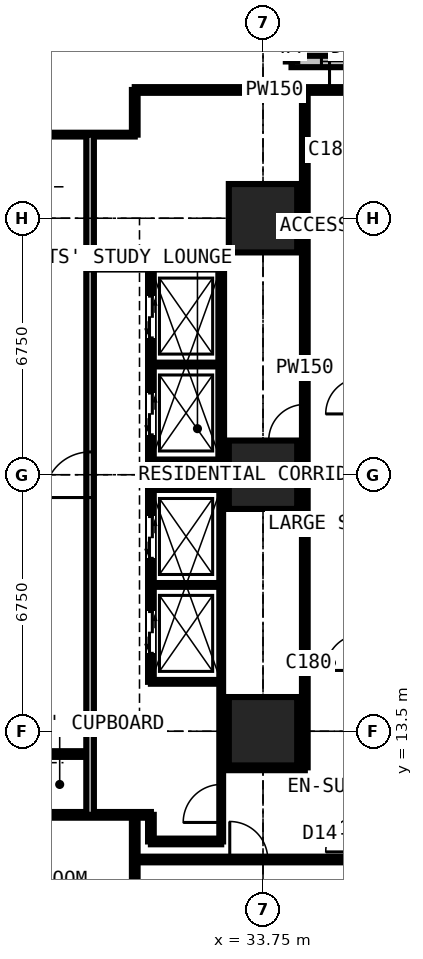
"""IFC4 building model, lengths in metres.
Left out: names, types, materials, properties, quantities, classifications, styles, units other than length and angle.
Written with IfcOpenShell. Run it as: python <this file> out.ifc"""

import sys

from ifc_helpers import new_model, si_unit, direction, frame, frame_2d, origin, origin_2d, place, context, subcontext, project, spatial, rectangle, extrude, element, fill, save


model = new_model("IFC4")
c1 = context("Model", 3, precision=1e-05, world=origin(), true_north=direction((0.0, 1.0)))
c2 = subcontext(c1, "Body", "Model", "MODEL_VIEW")
j1 = project(units=[si_unit("LENGTHUNIT", "METRE"), si_unit("PLANEANGLEUNIT", "RADIAN")], contexts=[c1])
p1 = place(None, origin())
s1 = spatial("IfcSite", under=j1, at=p1, CompositionType="ELEMENT")
p2 = place(p1, origin())
s2 = spatial("IfcBuilding", under=s1, at=p2, CompositionType="ELEMENT")
p3 = place(p2, frame((0.0, 0.0, 90.9)))
s3 = spatial("IfcBuildingStorey", under=s2, at=p3, CompositionType="ELEMENT", Elevation=90.9)
for number, where, z_axis, x_axis in (
    (1, (33.75, 13.5, 0.0), (0.0, 0.0, 1.0), (1.0, 0.0, 0.0)),
    (2, (33.75, 20.25, 0.0), (0.0, 0.0, 1.0), (1.0, 0.0, 0.0)),
    (3, (33.75, 27.0, 0.0), (0.0, 0.0, 1.0), (1.0, 0.0, 0.0)),
):
    element("IfcColumn", number, at=place(p3, frame(where, z_axis=z_axis, x_axis=x_axis)), inside=s3, PredefinedType="COLUMN", context=c2, shape_type="SweptSolid", body=[
        extrude(rectangle(XDim=1.8, YDim=1.8, at=origin_2d()), origin(), (0.0, 0.0, 1.0), 3.6),
    ])
p4 = place(p3, frame((37.875, 31.125, 0.0), z_axis=(0.0, 0.0, 1.0), x_axis=(-1.0, 0.0, 0.0)))
e4 = element("IfcWall", 4, at=p4, inside=s3, PredefinedType="SOLIDWALL", context=c2, shape_type="SweptSolid", body=[
    extrude(rectangle(XDim=3.375, YDim=0.3, at=frame_2d((1.688, 0.0))), origin(), (0.0, 0.0, 1.0), 3.375),
])
p5 = place(p4, frame((0.788, 0.0, 0.6)))
e5 = element("IfcOpeningElement", 5, at=p5, cuts=e4, PredefinedType="OPENING", context=c2, shape_type="SweptSolid", body=[
    extrude(rectangle(XDim=1.8, YDim=2.1, at=frame_2d((0.9, 1.05))), frame((0.0, 0.16, 0.0), z_axis=(0.0, -1.0, 0.0), x_axis=(1.0, 0.0, 0.0)), (0.0, 0.0, 1.0), 0.32),
])
p6 = place(p3, frame((34.5, 31.125, 0.0), z_axis=(0.0, 0.0, 1.0), x_axis=(0.0, 1.0, 0.0)))
e6 = element("IfcWall", 6, at=p6, inside=s3, PredefinedType="SOLIDWALL", context=c2, shape_type="SweptSolid", body=[
    extrude(rectangle(XDim=3.375, YDim=0.3, at=frame_2d((1.688, 0.0))), origin(), (0.0, 0.0, 1.0), 3.375),
])
p7 = place(p6, frame((0.343, 0.0, 0.9)))
e7 = element("IfcOpeningElement", 7, at=p7, cuts=e6, PredefinedType="OPENING", context=c2, shape_type="SweptSolid", body=[
    extrude(rectangle(XDim=1.2, YDim=1.8, at=frame_2d((0.6, 0.9))), frame((0.0, 0.16, 0.0), z_axis=(0.0, -1.0, 0.0), x_axis=(1.0, 0.0, 0.0)), (0.0, 0.0, 1.0), 0.32),
])
p8 = place(p3, frame((10.125, 11.3, 0.0), z_axis=(0.0, 0.0, 1.0), x_axis=(1.0, 0.0, 0.0)))
e8 = element("IfcWall", 8, at=p8, inside=s3, PredefinedType="PARTITIONING", context=c2, shape_type="SweptSolid", body=[
    extrude(rectangle(XDim=20.675, YDim=0.15, at=frame_2d((10.337, 0.0))), origin(), (0.0, 0.0, 1.0), 3.375),
])
p9 = place(p8, frame((8.375, 0.0, 0.0)))
e9 = element("IfcOpeningElement", 9, at=p9, cuts=e8, PredefinedType="OPENING", context=c2, shape_type="SweptSolid", body=[
    extrude(rectangle(XDim=1.0, YDim=2.2, at=frame_2d((0.5, 1.1))), frame((0.0, 0.085, 0.0), z_axis=(0.0, -1.0, 0.0), x_axis=(1.0, 0.0, 0.0)), (0.0, 0.0, 1.0), 0.17),
])
p10 = place(p8, frame((10.975, 0.0, 0.0)))
e10 = element("IfcOpeningElement", 10, at=p10, cuts=e8, PredefinedType="OPENING", context=c2, shape_type="SweptSolid", body=[
    extrude(rectangle(XDim=1.0, YDim=2.2, at=frame_2d((0.5, 1.1))), frame((0.0, 0.085, 0.0), z_axis=(0.0, -1.0, 0.0), x_axis=(1.0, 0.0, 0.0)), (0.0, 0.0, 1.0), 0.17),
])
p11 = place(p8, frame((3.925, 0.0, 0.0)))
e11 = element("IfcOpeningElement", 11, at=p11, cuts=e8, PredefinedType="OPENING", context=c2, shape_type="SweptSolid", body=[
    extrude(rectangle(XDim=0.95, YDim=2.2, at=frame_2d((0.475, 1.1))), frame((0.0, 0.085, 0.0), z_axis=(0.0, -1.0, 0.0), x_axis=(1.0, 0.0, 0.0)), (0.0, 0.0, 1.0), 0.17),
])
p12 = place(p3, frame((11.3, 29.2, 0.0), z_axis=(0.0, 0.0, 1.0), x_axis=(1.0, 0.0, 0.0)))
e12 = element("IfcWall", 12, at=p12, inside=s3, PredefinedType="PARTITIONING", context=c2, shape_type="SweptSolid", body=[
    extrude(rectangle(XDim=19.075, YDim=0.1, at=frame_2d((9.538, 0.0))), origin(), (0.0, 0.0, 1.0), 3.375),
])
p13 = place(p12, frame((6.4, 0.0, 0.0)))
e13 = element("IfcOpeningElement", 13, at=p13, cuts=e12, PredefinedType="OPENING", context=c2, shape_type="SweptSolid", body=[
    extrude(rectangle(XDim=0.95, YDim=2.2, at=frame_2d((0.475, 1.1))), frame((0.0, 0.06, 0.0), z_axis=(0.0, -1.0, 0.0), x_axis=(1.0, 0.0, 0.0)), (0.0, 0.0, 1.0), 0.12),
])
p14 = place(p12, frame((13.15, 0.0, 0.0)))
e14 = element("IfcOpeningElement", 14, at=p14, cuts=e12, PredefinedType="OPENING", context=c2, shape_type="SweptSolid", body=[
    extrude(rectangle(XDim=0.95, YDim=2.2, at=frame_2d((0.475, 1.1))), frame((0.0, 0.06, 0.0), z_axis=(0.0, -1.0, 0.0), x_axis=(1.0, 0.0, 0.0)), (0.0, 0.0, 1.0), 0.12),
])
p15 = place(p12, frame((0.6, 0.0, 0.0)))
e15 = element("IfcOpeningElement", 15, at=p15, cuts=e12, PredefinedType="OPENING", context=c2, shape_type="SweptSolid", body=[
    extrude(rectangle(XDim=1.0, YDim=2.2, at=frame_2d((0.5, 1.1))), frame((0.0, 0.06, 0.0), z_axis=(0.0, -1.0, 0.0), x_axis=(1.0, 0.0, 0.0)), (0.0, 0.0, 1.0), 0.12),
])
p16 = place(p3, frame((27.6, 12.9, 0.0), z_axis=(0.0, 0.0, 1.0), x_axis=(1.0, 0.0, 0.0)))
e16 = element("IfcWall", 16, at=p16, inside=s3, PredefinedType="PARTITIONING", context=c2, shape_type="SweptSolid", body=[
    extrude(rectangle(XDim=1.6, YDim=0.15, at=frame_2d((0.8, 0.0))), origin(), (0.0, 0.0, 1.0), 2.806),
])
p17 = place(p3, frame((29.2, 11.3, 0.0), z_axis=(0.0, 0.0, 1.0), x_axis=(0.0, 1.0, 0.0)))
e17 = element("IfcWall", 17, at=p17, inside=s3, PredefinedType="PARTITIONING", context=c2, shape_type="SweptSolid", body=[
    extrude(rectangle(XDim=17.9, YDim=0.2, at=frame_2d((8.95, 0.0))), origin(), (0.0, 0.0, 1.0), 3.375),
])
p18 = place(p17, frame((8.35, 0.0, 0.0)))
e18 = element("IfcOpeningElement", 18, at=p18, cuts=e17, PredefinedType="OPENING", context=c2, shape_type="SweptSolid", body=[
    extrude(rectangle(XDim=1.2, YDim=2.2, at=frame_2d((0.6, 1.1))), frame((0.0, 0.11, 0.0), z_axis=(0.0, -1.0, 0.0), x_axis=(1.0, 0.0, 0.0)), (0.0, 0.0, 1.0), 0.22),
])
p19 = place(p3, frame((29.2, 25.7, 0.0), z_axis=(0.0, 0.0, 1.0), x_axis=(1.0, 0.0, 0.0)))
e19 = element("IfcWall", 19, at=p19, inside=s3, PredefinedType="SHEAR", context=c2, shape_type="SweptSolid", body=[
    extrude(rectangle(XDim=3.45, YDim=0.1, at=frame_2d((1.725, 0.0))), origin(), (0.0, 0.0, 1.0), 3.375),
])
p20 = place(p3, frame((30.375, -0.734, 0.0), z_axis=(0.0, 0.0, 1.0), x_axis=(0.0, 1.0, 0.0)))
e20 = element("IfcWall", 20, at=p20, inside=s3, PredefinedType="PARTITIONING", context=c2, shape_type="SweptSolid", body=[
    extrude(rectangle(XDim=12.034, YDim=0.15, at=frame_2d((6.017, 0.0))), origin(), (0.0, 0.0, 1.0), 3.375),
])
p21 = place(p3, frame((30.375, 10.125, 0.0), z_axis=(0.0, 0.0, 1.0), x_axis=(1.0, 0.0, 0.0)))
e21 = element("IfcWall", 21, at=p21, inside=s3, PredefinedType="PARTITIONING", context=c2, shape_type="SweptSolid", body=[
    extrude(rectangle(XDim=10.859, YDim=0.15, at=frame_2d((5.429, 0.0))), origin(), (0.0, 0.0, 1.0), 3.375),
])
p22 = place(p21, frame((2.5, 0.0, 0.0)))
e22 = element("IfcOpeningElement", 22, at=p22, cuts=e21, PredefinedType="OPENING", context=c2, shape_type="SweptSolid", body=[
    extrude(rectangle(XDim=1.0, YDim=2.2, at=frame_2d((0.5, 1.1))), frame((0.0, 0.085, 0.0), z_axis=(0.0, -1.0, 0.0), x_axis=(1.0, 0.0, 0.0)), (0.0, 0.0, 1.0), 0.17),
])
p23 = place(p3, frame((30.375, 29.2, 0.0), z_axis=(0.0, 0.0, 1.0), x_axis=(0.0, 1.0, 0.0)))
e23 = element("IfcWall", 23, at=p23, inside=s3, PredefinedType="PARTITIONING", context=c2, shape_type="SweptSolid", body=[
    extrude(rectangle(XDim=1.175, YDim=0.15, at=frame_2d((0.587, 0.0))), origin(), (0.0, 0.0, 1.0), 3.375),
])
p24 = place(p3, frame((30.375, 30.375, 0.0), z_axis=(0.0, 0.0, 1.0), x_axis=(1.0, 0.0, 0.0)))
e24 = element("IfcWall", 24, at=p24, inside=s3, PredefinedType="PARTITIONING", context=c2, shape_type="SweptSolid", body=[
    extrude(rectangle(XDim=7.35, YDim=0.15, at=frame_2d((3.675, 0.0))), origin(), (0.0, 0.0, 1.0), 2.877),
])
p25 = place(p24, frame((5.125, 0.0, 0.0)))
e25 = element("IfcOpeningElement", 25, at=p25, cuts=e24, PredefinedType="OPENING", context=c2, shape_type="SweptSolid", body=[
    extrude(rectangle(XDim=1.0, YDim=2.2, at=frame_2d((0.5, 1.1))), frame((0.0, 0.085, 0.0), z_axis=(0.0, -1.0, 0.0), x_axis=(1.0, 0.0, 0.0)), (0.0, 0.0, 1.0), 0.17),
])
p26 = place(p3, frame((30.8, 10.6, 0.0), z_axis=(0.0, 0.0, 1.0), x_axis=(0.0, 1.0, 0.0)))
e26 = element("IfcWall", 26, at=p26, inside=s3, PredefinedType="PARTITIONING", context=c2, shape_type="SweptSolid", body=[
    extrude(rectangle(XDim=0.7, YDim=0.15, at=frame_2d((0.35, 0.0))), origin(), (0.0, 0.0, 1.0), 3.375),
])
p27 = place(p3, frame((30.8, 10.6, 0.0), z_axis=(0.0, 0.0, 1.0), x_axis=(1.0, 0.0, 0.0)))
e27 = element("IfcWall", 27, at=p27, inside=s3, PredefinedType="PARTITIONING", context=c2, shape_type="SweptSolid", body=[
    extrude(rectangle(XDim=1.85, YDim=0.15, at=frame_2d((0.925, 0.0))), origin(), (0.0, 0.0, 1.0), 3.375),
])
p28 = place(p3, frame((30.8, 14.8, 0.0), z_axis=(0.0, 0.0, 1.0), x_axis=(0.0, 1.0, 0.0)))
e28 = element("IfcWall", 28, at=p28, inside=s3, PredefinedType="PARTITIONING", context=c2, shape_type="SweptSolid", body=[
    extrude(rectangle(XDim=10.9, YDim=0.15, at=frame_2d((5.45, 0.0))), origin(), (0.0, 0.0, 1.0), 3.375),
])
p29 = place(p28, frame((0.75, 0.0, 0.0)))
e29 = element("IfcOpeningElement", 29, at=p29, cuts=e28, PredefinedType="OPENING", context=c2, shape_type="SweptSolid", body=[
    extrude(rectangle(XDim=1.1, YDim=2.2, at=frame_2d((0.55, 1.1))), frame((0.0, 0.085, 0.0), z_axis=(0.0, -1.0, 0.0), x_axis=(1.0, 0.0, 0.0)), (0.0, 0.0, 1.0), 0.17),
])
p30 = place(p28, frame((3.25, 0.0, 0.0)))
e30 = element("IfcOpeningElement", 30, at=p30, cuts=e28, PredefinedType="OPENING", context=c2, shape_type="SweptSolid", body=[
    extrude(rectangle(XDim=1.1, YDim=2.2, at=frame_2d((0.55, 1.1))), frame((0.0, 0.085, 0.0), z_axis=(0.0, -1.0, 0.0), x_axis=(1.0, 0.0, 0.0)), (0.0, 0.0, 1.0), 0.17),
])
p31 = place(p28, frame((6.5, 0.0, 0.0)))
e31 = element("IfcOpeningElement", 31, at=p31, cuts=e28, PredefinedType="OPENING", context=c2, shape_type="SweptSolid", body=[
    extrude(rectangle(XDim=1.1, YDim=2.2, at=frame_2d((0.55, 1.1))), frame((0.0, 0.085, 0.0), z_axis=(0.0, -1.0, 0.0), x_axis=(1.0, 0.0, 0.0)), (0.0, 0.0, 1.0), 0.17),
])
p32 = place(p28, frame((9.05, 0.0, 0.0)))
e32 = element("IfcOpeningElement", 32, at=p32, cuts=e28, PredefinedType="OPENING", context=c2, shape_type="SweptSolid", body=[
    extrude(rectangle(XDim=1.1, YDim=2.2, at=frame_2d((0.55, 1.1))), frame((0.0, 0.085, 0.0), z_axis=(0.0, -1.0, 0.0), x_axis=(1.0, 0.0, 0.0)), (0.0, 0.0, 1.0), 0.17),
])
for number, where, z_axis, x_axis in (
    (33, (30.8, 14.8, 0.0), (0.0, 0.0, 1.0), (1.0, 0.0, 0.0)),
    (34, (30.8, 17.35, 0.0), (0.0, 0.0, 1.0), (1.0, 0.0, 0.0)),
    (35, (30.8, 19.9, 0.0), (0.0, 0.0, 1.0), (1.0, 0.0, 0.0)),
    (36, (30.8, 20.6, 0.0), (0.0, 0.0, 1.0), (1.0, 0.0, 0.0)),
    (37, (30.8, 23.15, 0.0), (0.0, 0.0, 1.0), (1.0, 0.0, 0.0)),
):
    element("IfcWall", number, at=place(p3, frame(where, z_axis=z_axis, x_axis=x_axis)), inside=s3, PredefinedType="SHEAR", context=c2, shape_type="SweptSolid", body=[
        extrude(rectangle(XDim=1.85, YDim=0.1, at=frame_2d((0.925, 0.0))), origin(), (0.0, 0.0, 1.0), 3.375),
    ])
p33 = place(p3, frame((32.65, 10.6, 0.0), z_axis=(0.0, 0.0, 1.0), x_axis=(0.0, 1.0, 0.0)))
e38 = element("IfcWall", 38, at=p33, inside=s3, PredefinedType="SHEAR", context=c2, shape_type="SweptSolid", body=[
    extrude(rectangle(XDim=9.3, YDim=0.1, at=frame_2d((4.65, 0.0))), origin(), (0.0, 0.0, 1.0), 3.375),
])
p34 = place(p33, frame((0.5, 0.0, 0.0)))
e39 = element("IfcOpeningElement", 39, at=p34, cuts=e38, PredefinedType="OPENING", context=c2, shape_type="SweptSolid", body=[
    extrude(rectangle(XDim=1.0, YDim=2.2, at=frame_2d((0.5, 1.1))), frame((0.0, 0.06, 0.0), z_axis=(0.0, -1.0, 0.0), x_axis=(1.0, 0.0, 0.0)), (0.0, 0.0, 1.0), 0.12),
])
p35 = place(p3, frame((32.65, 12.55, 0.0), z_axis=(0.0, 0.0, 1.0), x_axis=(1.0, 0.0, 0.0)))
e40 = element("IfcWall", 40, at=p35, inside=s3, PredefinedType="PARTITIONING", context=c2, shape_type="SweptSolid", body=[
    extrude(rectangle(XDim=2.2, YDim=0.15, at=frame_2d((1.1, 0.0))), origin(), (0.0, 0.0, 1.0), 3.375),
])
p36 = place(p3, frame((32.65, 20.6, 0.0), z_axis=(0.0, 0.0, 1.0), x_axis=(0.0, 1.0, 0.0)))
e41 = element("IfcWall", 41, at=p36, inside=s3, PredefinedType="PARTITIONING", context=c2, shape_type="SweptSolid", body=[
    extrude(rectangle(XDim=5.1, YDim=0.15, at=frame_2d((2.55, 0.0))), origin(), (0.0, 0.0, 1.0), 3.375),
])
p37 = place(p3, frame((34.85, 12.55, 0.0), z_axis=(0.0, 0.0, 1.0), x_axis=(0.0, 1.0, 0.0)))
e42 = element("IfcWall", 42, at=p37, inside=s3, PredefinedType="PARTITIONING", context=c2, shape_type="SweptSolid", body=[
    extrude(rectangle(XDim=17.825, YDim=0.15, at=frame_2d((8.913, 0.0))), origin(), (0.0, 0.0, 1.0), 3.375),
])
p38 = place(p37, frame((8.6, 0.0, 0.0)))
e43 = element("IfcOpeningElement", 43, at=p38, cuts=e42, PredefinedType="OPENING", context=c2, shape_type="SweptSolid", body=[
    extrude(rectangle(XDim=0.95, YDim=2.2, at=frame_2d((0.475, 1.1))), frame((0.0, 0.085, 0.0), z_axis=(0.0, -1.0, 0.0), x_axis=(1.0, 0.0, 0.0)), (0.0, 0.0, 1.0), 0.17),
])
p39 = place(p5, origin())
e44 = element("IfcWindow", 44, at=p39, inside=s3, PartitioningType="SINGLE_PANEL", PredefinedType="WINDOW", context=c2, shape_type="SweptSolid", body=[
    extrude(rectangle(XDim=1.8, YDim=2.1, at=frame_2d((0.9, 1.05))), frame((0.0, 0.03, 0.0), z_axis=(0.0, -1.0, 0.0), x_axis=(1.0, 0.0, 0.0)), (0.0, 0.0, 1.0), 0.06),
])
fill(e5, e44)
p40 = place(p22, origin())
e45 = element("IfcDoor", 45, at=p40, inside=s3, OperationType="SINGLE_SWING_LEFT", PredefinedType="DOOR", context=c2, shape_type="SweptSolid", body=[
    extrude(rectangle(XDim=1.0, YDim=2.2, at=frame_2d((0.5, 1.1))), frame((0.0, 0.025, 0.0), z_axis=(0.0, -1.0, 0.0), x_axis=(1.0, 0.0, 0.0)), (0.0, 0.0, 1.0), 0.05),
])
fill(e22, e45)
p41 = place(p34, origin())
e46 = element("IfcDoor", 46, at=p41, inside=s3, OperationType="SINGLE_SWING_LEFT", PredefinedType="DOOR", context=c2, shape_type="SweptSolid", body=[
    extrude(rectangle(XDim=1.0, YDim=2.2, at=frame_2d((0.5, 1.1))), frame((0.0, 0.025, 0.0), z_axis=(0.0, -1.0, 0.0), x_axis=(1.0, 0.0, 0.0)), (0.0, 0.0, 1.0), 0.05),
])
fill(e39, e46)
p42 = place(p38, origin())
e47 = element("IfcDoor", 47, at=p42, inside=s3, OperationType="SINGLE_SWING_LEFT", PredefinedType="DOOR", context=c2, shape_type="SweptSolid", body=[
    extrude(rectangle(XDim=0.95, YDim=2.2, at=frame_2d((0.475, 1.1))), frame((0.0, 0.025, 0.0), z_axis=(0.0, -1.0, 0.0), x_axis=(1.0, 0.0, 0.0)), (0.0, 0.0, 1.0), 0.05),
])
fill(e43, e47)
p43 = place(p25, origin())
e48 = element("IfcDoor", 48, at=p43, inside=s3, OperationType="SINGLE_SWING_LEFT", PredefinedType="DOOR", context=c2, shape_type="SweptSolid", body=[
    extrude(rectangle(XDim=1.0, YDim=2.2, at=frame_2d((0.5, 1.1))), frame((0.0, 0.025, 0.0), z_axis=(0.0, -1.0, 0.0), x_axis=(1.0, 0.0, 0.0)), (0.0, 0.0, 1.0), 0.05),
])
fill(e25, e48)
p44 = place(p29, origin())
e49 = element("IfcDoor", 49, at=p44, inside=s3, OperationType="DOUBLE_DOOR_SLIDING", PredefinedType="DOOR", context=c2, shape_type="SweptSolid", body=[
    extrude(rectangle(XDim=1.1, YDim=2.2, at=frame_2d((0.55, 1.1))), frame((0.0, 0.025, 0.0), z_axis=(0.0, -1.0, 0.0), x_axis=(1.0, 0.0, 0.0)), (0.0, 0.0, 1.0), 0.05),
])
fill(e29, e49)
p45 = place(p30, origin())
e50 = element("IfcDoor", 50, at=p45, inside=s3, OperationType="DOUBLE_DOOR_SLIDING", PredefinedType="DOOR", context=c2, shape_type="SweptSolid", body=[
    extrude(rectangle(XDim=1.1, YDim=2.2, at=frame_2d((0.55, 1.1))), frame((0.0, 0.025, 0.0), z_axis=(0.0, -1.0, 0.0), x_axis=(1.0, 0.0, 0.0)), (0.0, 0.0, 1.0), 0.05),
])
fill(e30, e50)
p46 = place(p31, origin())
e51 = element("IfcDoor", 51, at=p46, inside=s3, OperationType="DOUBLE_DOOR_SLIDING", PredefinedType="DOOR", context=c2, shape_type="SweptSolid", body=[
    extrude(rectangle(XDim=1.1, YDim=2.2, at=frame_2d((0.55, 1.1))), frame((0.0, 0.025, 0.0), z_axis=(0.0, -1.0, 0.0), x_axis=(1.0, 0.0, 0.0)), (0.0, 0.0, 1.0), 0.05),
])
fill(e31, e51)
p47 = place(p32, origin())
e52 = element("IfcDoor", 52, at=p47, inside=s3, OperationType="DOUBLE_DOOR_SLIDING", PredefinedType="DOOR", context=c2, shape_type="SweptSolid", body=[
    extrude(rectangle(XDim=1.1, YDim=2.2, at=frame_2d((0.55, 1.1))), frame((0.0, 0.025, 0.0), z_axis=(0.0, -1.0, 0.0), x_axis=(1.0, 0.0, 0.0)), (0.0, 0.0, 1.0), 0.05),
])
fill(e32, e52)
p48 = place(p18, origin())
e53 = element("IfcDoor", 53, at=p48, inside=s3, OperationType="DOUBLE_DOOR_SINGLE_SWING", PredefinedType="DOOR", context=c2, shape_type="SweptSolid", body=[
    extrude(rectangle(XDim=1.2, YDim=2.2, at=frame_2d((0.6, 1.1))), frame((0.0, 0.025, 0.0), z_axis=(0.0, -1.0, 0.0), x_axis=(1.0, 0.0, 0.0)), (0.0, 0.0, 1.0), 0.05),
])
fill(e18, e53)
save(model, sys.argv[1])
